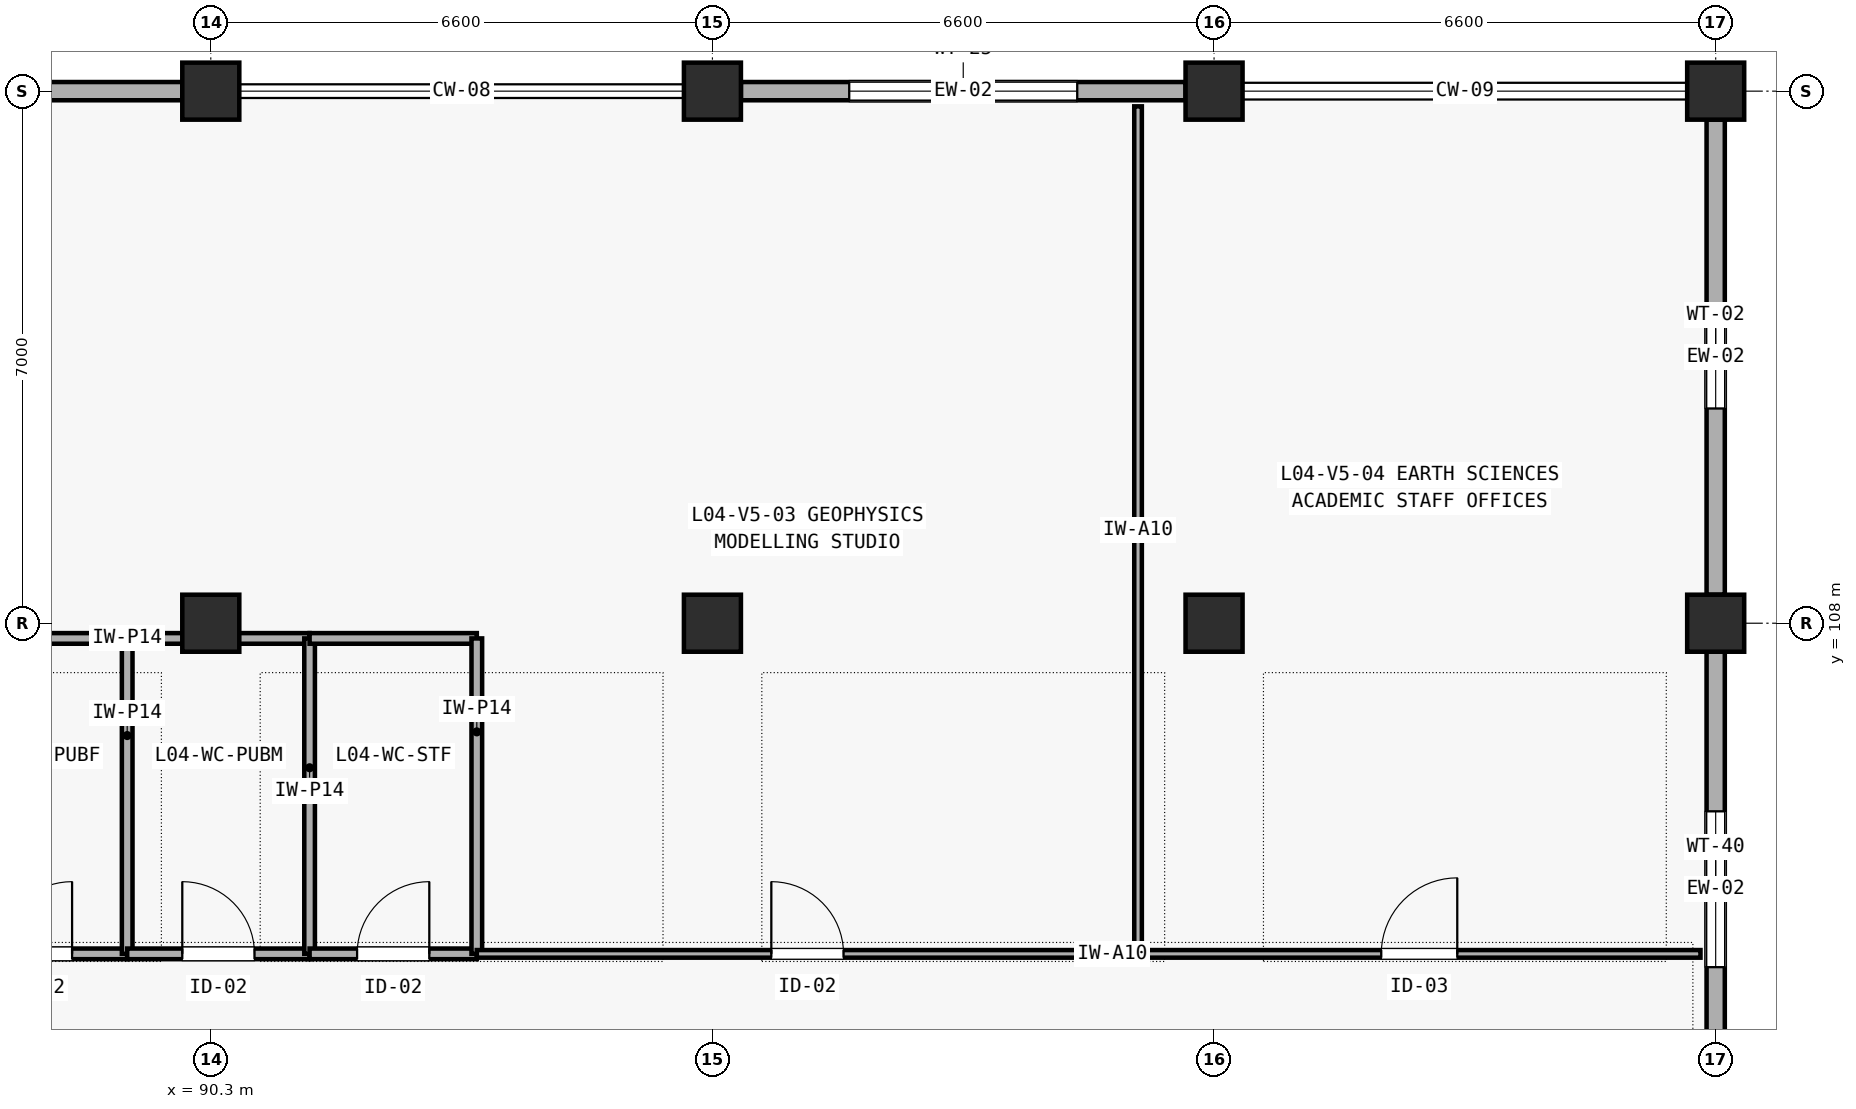
"""IFC4 building model, lengths in metres.
Left out: names, types, materials, properties, quantities, classifications, styles, units other than length and angle.
Written with IfcOpenShell. Run it as: python <this file> out.ifc"""

import sys

from ifc_helpers import new_model, si_unit, direction, frame, frame_2d, origin, origin_2d, place, context, subcontext, project, spatial, rectangle, extrude, element, fill, save


model = new_model("IFC4")
c1 = context("Model", 3, precision=1e-05, world=origin(), true_north=direction((0.0, 1.0)))
c2 = subcontext(c1, "Body", "Model", "MODEL_VIEW")
j1 = project(units=[si_unit("LENGTHUNIT", "METRE"), si_unit("PLANEANGLEUNIT", "RADIAN")], contexts=[c1])
p1 = place(None, origin())
s1 = spatial("IfcSite", under=j1, at=p1, CompositionType="ELEMENT")
p2 = place(p1, origin())
s2 = spatial("IfcBuilding", under=s1, at=p2, CompositionType="ELEMENT")
p3 = place(p2, frame((0.0, 0.0, 16.8)))
s3 = spatial("IfcBuildingStorey", under=s2, at=p3, CompositionType="ELEMENT", Elevation=16.8)
for number, where, z_axis, x_axis in (
    (1, (90.3, 108.0, 0.0), (0.0, 0.0, 1.0), (1.0, 0.0, 0.0)),
    (2, (90.3, 115.0, 0.0), (0.0, 0.0, 1.0), (1.0, 0.0, 0.0)),
    (3, (96.9, 108.0, 0.0), (0.0, 0.0, 1.0), (1.0, 0.0, 0.0)),
    (4, (96.9, 115.0, 0.0), (0.0, 0.0, 1.0), (1.0, 0.0, 0.0)),
    (5, (103.5, 108.0, 0.0), (0.0, 0.0, 1.0), (1.0, 0.0, 0.0)),
    (6, (103.5, 115.0, 0.0), (0.0, 0.0, 1.0), (1.0, 0.0, 0.0)),
    (7, (110.1, 108.0, 0.0), (0.0, 0.0, 1.0), (1.0, 0.0, 0.0)),
    (8, (110.1, 115.0, 0.0), (0.0, 0.0, 1.0), (1.0, 0.0, 0.0)),
):
    element("IfcColumn", number, at=place(p3, frame(where, z_axis=z_axis, x_axis=x_axis)), inside=s3, PredefinedType="COLUMN", context=c2, shape_type="SweptSolid", body=[
        extrude(rectangle(XDim=0.75, YDim=0.75, at=origin_2d()), origin(), (0.0, 0.0, 1.0), 4.2),
    ])
p4 = place(p3, frame((84.075, 115.0, 0.0), z_axis=(0.0, 0.0, 1.0), x_axis=(1.0, 0.0, 0.0)))
e9 = element("IfcWall", 9, at=p4, inside=s3, PredefinedType="SOLIDWALL", context=c2, shape_type="SweptSolid", body=[
    extrude(rectangle(XDim=5.85, YDim=0.24, at=frame_2d((2.925, 0.0))), origin(), (0.0, 0.0, 1.0), 3.345),
])
p5 = place(p4, frame((1.875, 0.0, 0.85)))
e10 = element("IfcOpeningElement", 10, at=p5, cuts=e9, PredefinedType="OPENING", context=c2, shape_type="SweptSolid", body=[
    extrude(rectangle(XDim=2.1, YDim=1.6, at=frame_2d((1.05, 0.8))), frame((0.0, 0.13, 0.0), z_axis=(0.0, -1.0, 0.0), x_axis=(1.0, 0.0, 0.0)), (0.0, 0.0, 1.0), 0.26),
])
p6 = place(p3, frame((97.275, 115.0, 0.0), z_axis=(0.0, 0.0, 1.0), x_axis=(1.0, 0.0, 0.0)))
e11 = element("IfcWall", 11, at=p6, inside=s3, PredefinedType="SOLIDWALL", context=c2, shape_type="SweptSolid", body=[
    extrude(rectangle(XDim=5.85, YDim=0.24, at=frame_2d((2.925, 0.0))), origin(), (0.0, 0.0, 1.0), 3.135),
])
p7 = place(p6, frame((1.425, 0.0, 0.85)))
e12 = element("IfcOpeningElement", 12, at=p7, cuts=e11, PredefinedType="OPENING", context=c2, shape_type="SweptSolid", body=[
    extrude(rectangle(XDim=3.0, YDim=1.6, at=frame_2d((1.5, 0.8))), frame((0.0, 0.13, 0.0), z_axis=(0.0, -1.0, 0.0), x_axis=(1.0, 0.0, 0.0)), (0.0, 0.0, 1.0), 0.26),
])
p8 = place(p3, frame((110.1, 101.375, 0.0), z_axis=(0.0, 0.0, 1.0), x_axis=(0.0, 1.0, 0.0)))
e13 = element("IfcWall", 13, at=p8, inside=s3, PredefinedType="SOLIDWALL", context=c2, shape_type="SweptSolid", body=[
    extrude(rectangle(XDim=6.25, YDim=0.24, at=frame_2d((3.125, 0.0))), origin(), (0.0, 0.0, 1.0), 3.505),
])
p9 = place(p8, frame((2.1, 0.0, 0.85)))
e14 = element("IfcOpeningElement", 14, at=p9, cuts=e13, PredefinedType="OPENING", context=c2, shape_type="SweptSolid", body=[
    extrude(rectangle(XDim=2.05, YDim=1.55, at=frame_2d((1.025, 0.775))), frame((0.0, 0.13, 0.0), z_axis=(0.0, -1.0, 0.0), x_axis=(1.0, 0.0, 0.0)), (0.0, 0.0, 1.0), 0.26),
])
p10 = place(p3, frame((110.1, 108.375, 0.0), z_axis=(0.0, 0.0, 1.0), x_axis=(0.0, 1.0, 0.0)))
e15 = element("IfcWall", 15, at=p10, inside=s3, PredefinedType="SOLIDWALL", context=c2, shape_type="SweptSolid", body=[
    extrude(rectangle(XDim=6.25, YDim=0.24, at=frame_2d((3.125, 0.0))), origin(), (0.0, 0.0, 1.0), 3.505),
])
p11 = place(p10, frame((2.45, 0.0, 0.85)))
e16 = element("IfcOpeningElement", 16, at=p11, cuts=e15, PredefinedType="OPENING", context=c2, shape_type="SweptSolid", body=[
    extrude(rectangle(XDim=1.35, YDim=1.35, at=frame_2d((0.675, 0.675))), frame((0.0, 0.13, 0.0), z_axis=(0.0, -1.0, 0.0), x_axis=(1.0, 0.0, 0.0)), (0.0, 0.0, 1.0), 0.26),
])
p12 = place(p3, frame((86.8, 103.65, 0.0), z_axis=(0.0, 0.0, 1.0), x_axis=(1.0, 0.0, 0.0)))
e17 = element("IfcWall", 17, at=p12, inside=s3, PredefinedType="PLUMBINGWALL", context=c2, shape_type="SweptSolid", body=[
    extrude(rectangle(XDim=2.4, YDim=0.14, at=frame_2d((1.2, 0.0))), origin(), (0.0, 0.0, 1.0), 3.9),
])
p13 = place(p12, frame((0.725, 0.0, 0.0)))
e18 = element("IfcOpeningElement", 18, at=p13, cuts=e17, PredefinedType="OPENING", context=c2, shape_type="SweptSolid", body=[
    extrude(rectangle(XDim=0.95, YDim=2.1, at=frame_2d((0.475, 1.05))), frame((0.0, 0.08, 0.0), z_axis=(0.0, -1.0, 0.0), x_axis=(1.0, 0.0, 0.0)), (0.0, 0.0, 1.0), 0.16),
])
p14 = place(p3, frame((86.8, 107.8, 0.0), z_axis=(0.0, 0.0, 1.0), x_axis=(1.0, 0.0, 0.0)))
e19 = element("IfcWall", 19, at=p14, inside=s3, PredefinedType="PLUMBINGWALL", context=c2, shape_type="SweptSolid", body=[
    extrude(rectangle(XDim=2.4, YDim=0.14, at=frame_2d((1.2, 0.0))), origin(), (0.0, 0.0, 1.0), 3.345),
])
p15 = place(p3, frame((89.2, 103.65, 0.0), z_axis=(0.0, 0.0, 1.0), x_axis=(0.0, 1.0, 0.0)))
e20 = element("IfcWall", 20, at=p15, inside=s3, PredefinedType="PLUMBINGWALL", context=c2, shape_type="SweptSolid", body=[
    extrude(rectangle(XDim=4.15, YDim=0.14, at=frame_2d((2.075, 0.0))), origin(), (0.0, 0.0, 1.0), 3.9),
])
p16 = place(p3, frame((89.2, 103.65, 0.0), z_axis=(0.0, 0.0, 1.0), x_axis=(1.0, 0.0, 0.0)))
e21 = element("IfcWall", 21, at=p16, inside=s3, PredefinedType="PLUMBINGWALL", context=c2, shape_type="SweptSolid", body=[
    extrude(rectangle(XDim=2.4, YDim=0.14, at=frame_2d((1.2, 0.0))), origin(), (0.0, 0.0, 1.0), 3.9),
])
p17 = place(p16, frame((0.725, 0.0, 0.0)))
e22 = element("IfcOpeningElement", 22, at=p17, cuts=e21, PredefinedType="OPENING", context=c2, shape_type="SweptSolid", body=[
    extrude(rectangle(XDim=0.95, YDim=2.1, at=frame_2d((0.475, 1.05))), frame((0.0, 0.08, 0.0), z_axis=(0.0, -1.0, 0.0), x_axis=(1.0, 0.0, 0.0)), (0.0, 0.0, 1.0), 0.16),
])
p18 = place(p3, frame((89.2, 107.8, 0.0), z_axis=(0.0, 0.0, 1.0), x_axis=(1.0, 0.0, 0.0)))
e23 = element("IfcWall", 23, at=p18, inside=s3, PredefinedType="PLUMBINGWALL", context=c2, shape_type="SweptSolid", body=[
    extrude(rectangle(XDim=2.4, YDim=0.14, at=frame_2d((1.2, 0.0))), origin(), (0.0, 0.0, 1.0), 3.345),
])
p19 = place(p3, frame((91.6, 103.65, 0.0), z_axis=(0.0, 0.0, 1.0), x_axis=(0.0, 1.0, 0.0)))
e24 = element("IfcWall", 24, at=p19, inside=s3, PredefinedType="PLUMBINGWALL", context=c2, shape_type="SweptSolid", body=[
    extrude(rectangle(XDim=4.15, YDim=0.14, at=frame_2d((2.075, 0.0))), origin(), (0.0, 0.0, 1.0), 3.9),
])
p20 = place(p3, frame((91.6, 103.65, 0.0), z_axis=(0.0, 0.0, 1.0), x_axis=(1.0, 0.0, 0.0)))
e25 = element("IfcWall", 25, at=p20, inside=s3, PredefinedType="PLUMBINGWALL", context=c2, shape_type="SweptSolid", body=[
    extrude(rectangle(XDim=2.2, YDim=0.14, at=frame_2d((1.1, 0.0))), origin(), (0.0, 0.0, 1.0), 3.9),
])
p21 = place(p20, frame((0.625, 0.0, 0.0)))
e26 = element("IfcOpeningElement", 26, at=p21, cuts=e25, PredefinedType="OPENING", context=c2, shape_type="SweptSolid", body=[
    extrude(rectangle(XDim=0.95, YDim=2.1, at=frame_2d((0.475, 1.05))), frame((0.0, 0.08, 0.0), z_axis=(0.0, -1.0, 0.0), x_axis=(1.0, 0.0, 0.0)), (0.0, 0.0, 1.0), 0.16),
])
p22 = place(p3, frame((91.6, 107.8, 0.0), z_axis=(0.0, 0.0, 1.0), x_axis=(1.0, 0.0, 0.0)))
e27 = element("IfcWall", 27, at=p22, inside=s3, PredefinedType="PLUMBINGWALL", context=c2, shape_type="SweptSolid", body=[
    extrude(rectangle(XDim=2.2, YDim=0.14, at=frame_2d((1.1, 0.0))), origin(), (0.0, 0.0, 1.0), 3.345),
])
p23 = place(p3, frame((93.8, 103.65, 0.0), z_axis=(0.0, 0.0, 1.0), x_axis=(0.0, 1.0, 0.0)))
e28 = element("IfcWall", 28, at=p23, inside=s3, PredefinedType="PLUMBINGWALL", context=c2, shape_type="SweptSolid", body=[
    extrude(rectangle(XDim=4.15, YDim=0.14, at=frame_2d((2.075, 0.0))), origin(), (0.0, 0.0, 1.0), 3.9),
])
p24 = place(p3, frame((93.8, 103.65, 0.0), z_axis=(0.0, 0.0, 1.0), x_axis=(1.0, 0.0, 0.0)))
e29 = element("IfcWall", 29, at=p24, inside=s3, PredefinedType="PARTITIONING", context=c2, shape_type="SweptSolid", body=[
    extrude(rectangle(XDim=8.7, YDim=0.1, at=frame_2d((4.35, 0.0))), origin(), (0.0, 0.0, 1.0), 3.9),
])
p25 = place(p24, frame((3.875, 0.0, 0.0)))
e30 = element("IfcOpeningElement", 30, at=p25, cuts=e29, PredefinedType="OPENING", context=c2, shape_type="SweptSolid", body=[
    extrude(rectangle(XDim=0.95, YDim=2.1, at=frame_2d((0.475, 1.05))), frame((0.0, 0.06, 0.0), z_axis=(0.0, -1.0, 0.0), x_axis=(1.0, 0.0, 0.0)), (0.0, 0.0, 1.0), 0.12),
])
p26 = place(p3, frame((102.5, 103.65, 0.0), z_axis=(0.0, 0.0, 1.0), x_axis=(0.0, 1.0, 0.0)))
e31 = element("IfcWall", 31, at=p26, inside=s3, PredefinedType="PARTITIONING", context=c2, shape_type="SweptSolid", body=[
    extrude(rectangle(XDim=11.15, YDim=0.1, at=frame_2d((5.575, 0.0))), origin(), (0.0, 0.0, 1.0), 3.9),
])
p27 = place(p3, frame((102.5, 103.65, 0.0), z_axis=(0.0, 0.0, 1.0), x_axis=(1.0, 0.0, 0.0)))
e32 = element("IfcWall", 32, at=p27, inside=s3, PredefinedType="PARTITIONING", context=c2, shape_type="SweptSolid", body=[
    extrude(rectangle(XDim=7.4, YDim=0.1, at=frame_2d((3.7, 0.0))), origin(), (0.0, 0.0, 1.0), 3.9),
])
p28 = place(p27, frame((3.2, 0.0, 0.0)))
e33 = element("IfcOpeningElement", 33, at=p28, cuts=e32, PredefinedType="OPENING", context=c2, shape_type="SweptSolid", body=[
    extrude(rectangle(XDim=1.0, YDim=2.1, at=frame_2d((0.5, 1.05))), frame((0.0, 0.06, 0.0), z_axis=(0.0, -1.0, 0.0), x_axis=(1.0, 0.0, 0.0)), (0.0, 0.0, 1.0), 0.12),
])
p29 = place(p7, origin())
e34 = element("IfcWindow", 34, at=p29, inside=s3, PartitioningType="SINGLE_PANEL", PredefinedType="WINDOW", context=c2, shape_type="SweptSolid", body=[
    extrude(rectangle(XDim=3.0, YDim=1.6, at=frame_2d((1.5, 0.8))), frame((0.0, 0.03, 0.0), z_axis=(0.0, -1.0, 0.0), x_axis=(1.0, 0.0, 0.0)), (0.0, 0.0, 1.0), 0.06),
])
fill(e12, e34)
p30 = place(p9, origin())
e35 = element("IfcWindow", 35, at=p30, inside=s3, PartitioningType="SINGLE_PANEL", PredefinedType="WINDOW", context=c2, shape_type="SweptSolid", body=[
    extrude(rectangle(XDim=2.05, YDim=1.55, at=frame_2d((1.025, 0.775))), frame((0.0, 0.03, 0.0), z_axis=(0.0, -1.0, 0.0), x_axis=(1.0, 0.0, 0.0)), (0.0, 0.0, 1.0), 0.06),
])
fill(e14, e35)
p31 = place(p11, origin())
e36 = element("IfcWindow", 36, at=p31, inside=s3, PartitioningType="SINGLE_PANEL", PredefinedType="WINDOW", context=c2, shape_type="SweptSolid", body=[
    extrude(rectangle(XDim=1.35, YDim=1.35, at=frame_2d((0.675, 0.675))), frame((0.0, 0.03, 0.0), z_axis=(0.0, -1.0, 0.0), x_axis=(1.0, 0.0, 0.0)), (0.0, 0.0, 1.0), 0.06),
])
fill(e16, e36)
p32 = place(p13, origin())
e37 = element("IfcDoor", 37, at=p32, inside=s3, OperationType="SINGLE_SWING_RIGHT", PredefinedType="DOOR", context=c2, shape_type="SweptSolid", body=[
    extrude(rectangle(XDim=0.95, YDim=2.1, at=frame_2d((0.475, 1.05))), frame((0.0, 0.025, 0.0), z_axis=(0.0, -1.0, 0.0), x_axis=(1.0, 0.0, 0.0)), (0.0, 0.0, 1.0), 0.05),
])
fill(e18, e37)
p33 = place(p17, origin())
e38 = element("IfcDoor", 38, at=p33, inside=s3, OperationType="SINGLE_SWING_LEFT", PredefinedType="DOOR", context=c2, shape_type="SweptSolid", body=[
    extrude(rectangle(XDim=0.95, YDim=2.1, at=frame_2d((0.475, 1.05))), frame((0.0, 0.025, 0.0), z_axis=(0.0, -1.0, 0.0), x_axis=(1.0, 0.0, 0.0)), (0.0, 0.0, 1.0), 0.05),
])
fill(e22, e38)
p34 = place(p21, origin())
e39 = element("IfcDoor", 39, at=p34, inside=s3, OperationType="SINGLE_SWING_RIGHT", PredefinedType="DOOR", context=c2, shape_type="SweptSolid", body=[
    extrude(rectangle(XDim=0.95, YDim=2.1, at=frame_2d((0.475, 1.05))), frame((0.0, 0.025, 0.0), z_axis=(0.0, -1.0, 0.0), x_axis=(1.0, 0.0, 0.0)), (0.0, 0.0, 1.0), 0.05),
])
fill(e26, e39)
p35 = place(p25, origin())
e40 = element("IfcDoor", 40, at=p35, inside=s3, OperationType="SINGLE_SWING_LEFT", PredefinedType="DOOR", context=c2, shape_type="SweptSolid", body=[
    extrude(rectangle(XDim=0.95, YDim=2.1, at=frame_2d((0.475, 1.05))), frame((0.0, 0.025, 0.0), z_axis=(0.0, -1.0, 0.0), x_axis=(1.0, 0.0, 0.0)), (0.0, 0.0, 1.0), 0.05),
])
fill(e30, e40)
p36 = place(p28, origin())
e41 = element("IfcDoor", 41, at=p36, inside=s3, OperationType="SINGLE_SWING_RIGHT", PredefinedType="DOOR", context=c2, shape_type="SweptSolid", body=[
    extrude(rectangle(XDim=1.0, YDim=2.1, at=frame_2d((0.5, 1.05))), frame((0.0, 0.025, 0.0), z_axis=(0.0, -1.0, 0.0), x_axis=(1.0, 0.0, 0.0)), (0.0, 0.0, 1.0), 0.05),
])
fill(e33, e41)
save(model, sys.argv[1])
